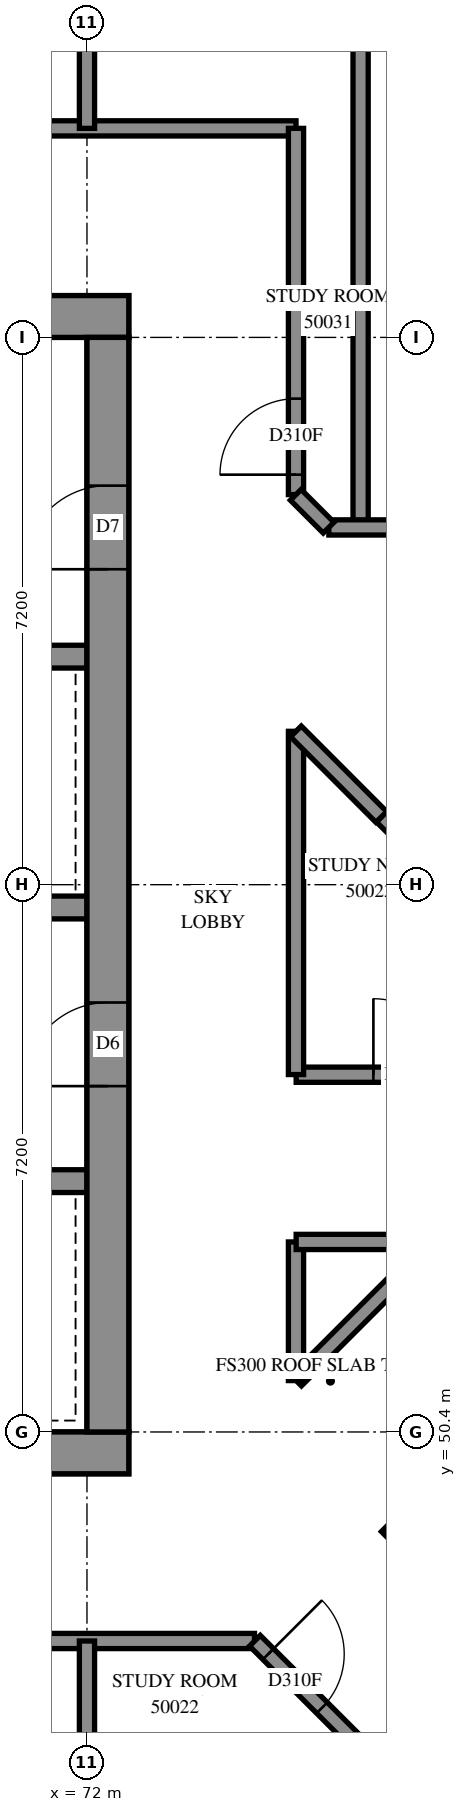
"""IFC4 building model, lengths in metres.
Left out: names, types, materials, properties, quantities, classifications, styles, units other than length and angle.
Written with IfcOpenShell. Run it as: python <this file> out.ifc"""

import sys

from ifc_helpers import new_model, si_unit, direction, frame, frame_2d, origin, place, context, subcontext, project, spatial, rectangle, extrude, element, fill, save


model = new_model("IFC4")
c1 = context("Model", 3, precision=1e-05, world=origin(), true_north=direction((0.0, 1.0)))
c2 = subcontext(c1, "Body", "Model", "MODEL_VIEW")
j1 = project(units=[si_unit("LENGTHUNIT", "METRE"), si_unit("PLANEANGLEUNIT", "RADIAN")], contexts=[c1])
p1 = place(None, origin())
s1 = spatial("IfcSite", under=j1, at=p1, CompositionType="ELEMENT")
p2 = place(p1, origin())
s2 = spatial("IfcBuilding", under=s1, at=p2, CompositionType="ELEMENT")
p3 = place(p2, frame((0.0, 0.0, 185.4)))
s3 = spatial("IfcBuildingStorey", under=s2, at=p3, CompositionType="ELEMENT", Elevation=185.4)
p4 = place(p3, frame((57.05, 50.125, -0.3), z_axis=(0.0, 0.0, 1.0), x_axis=(1.0, 0.0, 0.0)))
e1 = element("IfcWall", 1, at=p4, inside=s3, PredefinedType="SHEAR", context=c2, shape_type="SweptSolid", body=[
    extrude(rectangle(XDim=15.5, YDim=0.55, at=frame_2d((7.75, 0.0))), origin(), (0.0, 0.0, 1.0), 3.5),
])
p5 = place(p3, frame((57.05, 65.075, -0.3), z_axis=(0.0, 0.0, 1.0), x_axis=(1.0, 0.0, 0.0)))
e2 = element("IfcWall", 2, at=p5, inside=s3, PredefinedType="SHEAR", context=c2, shape_type="SweptSolid", body=[
    extrude(rectangle(XDim=15.5, YDim=0.55, at=frame_2d((7.75, 0.0))), origin(), (0.0, 0.0, 1.0), 3.5),
])
p6 = place(p5, frame((10.55, 0.0, 0.3)))
e3 = element("IfcOpeningElement", 3, at=p6, cuts=e2, PredefinedType="OPENING", context=c2, shape_type="SweptSolid", body=[
    extrude(rectangle(XDim=0.8, YDim=2.1, at=frame_2d((0.4, 1.05))), frame((0.0, 0.285, 0.0), z_axis=(0.0, -1.0, 0.0), x_axis=(1.0, 0.0, 0.0)), (0.0, 0.0, 1.0), 0.57),
])
p7 = place(p3, frame((72.275, 50.4, -0.3), z_axis=(0.0, 0.0, 1.0), x_axis=(0.0, 1.0, 0.0)))
e4 = element("IfcWall", 4, at=p7, inside=s3, PredefinedType="SHEAR", context=c2, shape_type="SweptSolid", body=[
    extrude(rectangle(XDim=14.4, YDim=0.55, at=frame_2d((7.2, 0.0))), origin(), (0.0, 0.0, 1.0), 3.5),
])
p8 = place(p7, frame((4.55, 0.0, 0.3)))
e5 = element("IfcOpeningElement", 5, at=p8, cuts=e4, PredefinedType="OPENING", context=c2, shape_type="SweptSolid", body=[
    extrude(rectangle(XDim=1.1, YDim=2.1, at=frame_2d((0.55, 1.05))), frame((0.0, 0.285, 0.0), z_axis=(0.0, -1.0, 0.0), x_axis=(1.0, 0.0, 0.0)), (0.0, 0.0, 1.0), 0.57),
])
p9 = place(p7, frame((11.35, 0.0, 0.3)))
e6 = element("IfcOpeningElement", 6, at=p9, cuts=e4, PredefinedType="OPENING", context=c2, shape_type="SweptSolid", body=[
    extrude(rectangle(XDim=1.1, YDim=2.1, at=frame_2d((0.55, 1.05))), frame((0.0, 0.285, 0.0), z_axis=(0.0, -1.0, 0.0), x_axis=(1.0, 0.0, 0.0)), (0.0, 0.0, 1.0), 0.57),
])
p10 = place(p3, frame((57.6, 53.7, 0.0), z_axis=(0.0, 0.0, 1.0), x_axis=(1.0, 0.0, 0.0)))
e7 = element("IfcWall", 7, at=p10, inside=s3, PredefinedType="SOLIDWALL", context=c2, shape_type="SweptSolid", body=[
    extrude(rectangle(XDim=14.4, YDim=0.3, at=frame_2d((7.2, 0.0))), origin(), (0.0, 0.0, 1.0), 3.9),
])
p11 = place(p10, frame((1.35, 0.0, 0.0)))
e8 = element("IfcOpeningElement", 8, at=p11, cuts=e7, PredefinedType="OPENING", context=c2, shape_type="SweptSolid", body=[
    extrude(rectangle(XDim=0.9, YDim=2.1, at=frame_2d((0.45, 1.05))), frame((0.0, 0.16, 0.0), z_axis=(0.0, -1.0, 0.0), x_axis=(1.0, 0.0, 0.0)), (0.0, 0.0, 1.0), 0.32),
])
p12 = place(p10, frame((4.95, 0.0, 0.0)))
e9 = element("IfcOpeningElement", 9, at=p12, cuts=e7, PredefinedType="OPENING", context=c2, shape_type="SweptSolid", body=[
    extrude(rectangle(XDim=0.9, YDim=2.1, at=frame_2d((0.45, 1.05))), frame((0.0, 0.16, 0.0), z_axis=(0.0, -1.0, 0.0), x_axis=(1.0, 0.0, 0.0)), (0.0, 0.0, 1.0), 0.32),
])
p13 = place(p10, frame((8.55, 0.0, 0.0)))
e10 = element("IfcOpeningElement", 10, at=p13, cuts=e7, PredefinedType="OPENING", context=c2, shape_type="SweptSolid", body=[
    extrude(rectangle(XDim=0.9, YDim=2.1, at=frame_2d((0.45, 1.05))), frame((0.0, 0.16, 0.0), z_axis=(0.0, -1.0, 0.0), x_axis=(1.0, 0.0, 0.0)), (0.0, 0.0, 1.0), 0.32),
])
p14 = place(p10, frame((12.05, 0.0, 0.0)))
e11 = element("IfcOpeningElement", 11, at=p14, cuts=e7, PredefinedType="OPENING", context=c2, shape_type="SweptSolid", body=[
    extrude(rectangle(XDim=1.1, YDim=2.1, at=frame_2d((0.55, 1.05))), frame((0.0, 0.16, 0.0), z_axis=(0.0, -1.0, 0.0), x_axis=(1.0, 0.0, 0.0)), (0.0, 0.0, 1.0), 0.32),
])
p15 = place(p3, frame((57.6, 57.3, 0.0), z_axis=(0.0, 0.0, 1.0), x_axis=(1.0, 0.0, 0.0)))
e12 = element("IfcWall", 12, at=p15, inside=s3, PredefinedType="SOLIDWALL", context=c2, shape_type="SweptSolid", body=[
    extrude(rectangle(XDim=14.4, YDim=0.3, at=frame_2d((7.2, 0.0))), origin(), (0.0, 0.0, 1.0), 3.9),
])
p16 = place(p15, frame((1.25, 0.0, 0.0)))
e13 = element("IfcOpeningElement", 13, at=p16, cuts=e12, PredefinedType="OPENING", context=c2, shape_type="SweptSolid", body=[
    extrude(rectangle(XDim=1.1, YDim=2.1, at=frame_2d((0.55, 1.05))), frame((0.0, 0.16, 0.0), z_axis=(0.0, -1.0, 0.0), x_axis=(1.0, 0.0, 0.0)), (0.0, 0.0, 1.0), 0.32),
])
p17 = place(p15, frame((4.85, 0.0, 0.0)))
e14 = element("IfcOpeningElement", 14, at=p17, cuts=e12, PredefinedType="OPENING", context=c2, shape_type="SweptSolid", body=[
    extrude(rectangle(XDim=1.1, YDim=2.1, at=frame_2d((0.55, 1.05))), frame((0.0, 0.16, 0.0), z_axis=(0.0, -1.0, 0.0), x_axis=(1.0, 0.0, 0.0)), (0.0, 0.0, 1.0), 0.32),
])
p18 = place(p15, frame((8.45, 0.0, 0.0)))
e15 = element("IfcOpeningElement", 15, at=p18, cuts=e12, PredefinedType="OPENING", context=c2, shape_type="SweptSolid", body=[
    extrude(rectangle(XDim=1.1, YDim=2.1, at=frame_2d((0.55, 1.05))), frame((0.0, 0.16, 0.0), z_axis=(0.0, -1.0, 0.0), x_axis=(1.0, 0.0, 0.0)), (0.0, 0.0, 1.0), 0.32),
])
p19 = place(p15, frame((12.05, 0.0, 0.0)))
e16 = element("IfcOpeningElement", 16, at=p19, cuts=e12, PredefinedType="OPENING", context=c2, shape_type="SweptSolid", body=[
    extrude(rectangle(XDim=1.1, YDim=2.1, at=frame_2d((0.55, 1.05))), frame((0.0, 0.16, 0.0), z_axis=(0.0, -1.0, 0.0), x_axis=(1.0, 0.0, 0.0)), (0.0, 0.0, 1.0), 0.32),
])
p20 = place(p3, frame((64.8, 60.6, 0.0), z_axis=(0.0, 0.0, 1.0), x_axis=(1.0, 0.0, 0.0)))
e17 = element("IfcWall", 17, at=p20, inside=s3, PredefinedType="SOLIDWALL", context=c2, shape_type="SweptSolid", body=[
    extrude(rectangle(XDim=7.2, YDim=0.3, at=frame_2d((3.6, 0.0))), origin(), (0.0, 0.0, 1.0), 3.9),
])
p21 = place(p3, frame((76.071, 49.284, -0.3), z_axis=(0.0, 0.0, 1.0), x_axis=(0.7071035554, -0.707110007, 0.0)))
e18 = element("IfcWall", 18, at=p21, inside=s3, PredefinedType="SHEAR", context=c2, shape_type="SweptSolid", body=[
    extrude(rectangle(XDim=15.5, YDim=0.55, at=frame_2d((7.75, 0.0))), origin(), (0.0, 0.0, 1.0), 3.5),
])
p22 = place(p3, frame((54.85, 67.55, 0.0), z_axis=(0.0, 0.0, 1.0), x_axis=(1.0, 0.0, 0.0)))
e19 = element("IfcWall", 19, at=p22, inside=s3, PredefinedType="PARTITIONING", context=c2, shape_type="SweptSolid", body=[
    extrude(rectangle(XDim=19.9, YDim=0.2, at=frame_2d((9.95, 0.0))), origin(), (0.0, 0.0, 1.0), 3.9),
])
p23 = place(p22, frame((4.843, 0.0, 0.0)))
e20 = element("IfcOpeningElement", 20, at=p23, cuts=e19, PredefinedType="OPENING", context=c2, shape_type="SweptSolid", body=[
    extrude(rectangle(XDim=1.0, YDim=2.1, at=frame_2d((0.5, 1.05))), frame((0.0, 0.11, 0.0), z_axis=(0.0, -1.0, 0.0), x_axis=(1.0, 0.0, 0.0)), (0.0, 0.0, 1.0), 0.22),
])
p24 = place(p22, frame((6.918, 0.0, 0.0)))
e21 = element("IfcOpeningElement", 21, at=p24, cuts=e19, PredefinedType="OPENING", context=c2, shape_type="SweptSolid", body=[
    extrude(rectangle(XDim=1.0, YDim=2.1, at=frame_2d((0.5, 1.05))), frame((0.0, 0.11, 0.0), z_axis=(0.0, -1.0, 0.0), x_axis=(1.0, 0.0, 0.0)), (0.0, 0.0, 1.0), 0.22),
])
p25 = place(p22, frame((12.043, 0.0, 0.0)))
e22 = element("IfcOpeningElement", 22, at=p25, cuts=e19, PredefinedType="OPENING", context=c2, shape_type="SweptSolid", body=[
    extrude(rectangle(XDim=1.0, YDim=2.1, at=frame_2d((0.5, 1.05))), frame((0.0, 0.11, 0.0), z_axis=(0.0, -1.0, 0.0), x_axis=(1.0, 0.0, 0.0)), (0.0, 0.0, 1.0), 0.22),
])
p26 = place(p22, frame((14.117, 0.0, 0.0)))
e23 = element("IfcOpeningElement", 23, at=p26, cuts=e19, PredefinedType="OPENING", context=c2, shape_type="SweptSolid", body=[
    extrude(rectangle(XDim=1.0, YDim=2.1, at=frame_2d((0.5, 1.05))), frame((0.0, 0.11, 0.0), z_axis=(0.0, -1.0, 0.0), x_axis=(1.0, 0.0, 0.0)), (0.0, 0.0, 1.0), 0.22),
])
p27 = place(p3, frame((54.85, 47.65, 0.0), z_axis=(0.0, 0.0, 1.0), x_axis=(1.0, 0.0, 0.0)))
e24 = element("IfcWall", 24, at=p27, inside=s3, PredefinedType="PARTITIONING", context=c2, shape_type="SweptSolid", body=[
    extrude(rectangle(XDim=19.354, YDim=0.2, at=frame_2d((9.677, 0.0))), origin(), (0.0, 0.0, 1.0), 3.9),
])
p28 = place(p27, frame((4.782, 0.0, 0.0)))
e25 = element("IfcOpeningElement", 25, at=p28, cuts=e24, PredefinedType="OPENING", context=c2, shape_type="SweptSolid", body=[
    extrude(rectangle(XDim=1.0, YDim=2.1, at=frame_2d((0.5, 1.05))), frame((0.0, 0.11, 0.0), z_axis=(0.0, -1.0, 0.0), x_axis=(1.0, 0.0, 0.0)), (0.0, 0.0, 1.0), 0.22),
])
p29 = place(p27, frame((6.857, 0.0, 0.0)))
e26 = element("IfcOpeningElement", 26, at=p29, cuts=e24, PredefinedType="OPENING", context=c2, shape_type="SweptSolid", body=[
    extrude(rectangle(XDim=1.0, YDim=2.1, at=frame_2d((0.5, 1.05))), frame((0.0, 0.11, 0.0), z_axis=(0.0, -1.0, 0.0), x_axis=(1.0, 0.0, 0.0)), (0.0, 0.0, 1.0), 0.22),
])
p30 = place(p27, frame((11.982, 0.0, 0.0)))
e27 = element("IfcOpeningElement", 27, at=p30, cuts=e24, PredefinedType="OPENING", context=c2, shape_type="SweptSolid", body=[
    extrude(rectangle(XDim=1.0, YDim=2.1, at=frame_2d((0.5, 1.05))), frame((0.0, 0.11, 0.0), z_axis=(0.0, -1.0, 0.0), x_axis=(1.0, 0.0, 0.0)), (0.0, 0.0, 1.0), 0.22),
])
p31 = place(p27, frame((14.057, 0.0, 0.0)))
e28 = element("IfcOpeningElement", 28, at=p31, cuts=e24, PredefinedType="OPENING", context=c2, shape_type="SweptSolid", body=[
    extrude(rectangle(XDim=1.0, YDim=2.1, at=frame_2d((0.5, 1.05))), frame((0.0, 0.11, 0.0), z_axis=(0.0, -1.0, 0.0), x_axis=(1.0, 0.0, 0.0)), (0.0, 0.0, 1.0), 0.22),
])
p32 = place(p3, frame((75.6, 62.3, 0.0), z_axis=(0.0, 0.0, 1.0), x_axis=(0.0, 1.0, 0.0)))
e29 = element("IfcWall", 29, at=p32, inside=s3, PredefinedType="PARTITIONING", context=c2, shape_type="SweptSolid", body=[
    extrude(rectangle(XDim=7.77, YDim=0.2, at=frame_2d((3.885, 0.0))), origin(), (0.0, 0.0, 1.0), 3.9),
])
p33 = place(p3, frame((74.75, 62.732, 0.0), z_axis=(0.0, 0.0, 1.0), x_axis=(0.0, 1.0, 0.0)))
e30 = element("IfcWall", 30, at=p33, inside=s3, PredefinedType="PARTITIONING", context=c2, shape_type="SweptSolid", body=[
    extrude(rectangle(XDim=4.818, YDim=0.2, at=frame_2d((2.409, 0.0))), origin(), (0.0, 0.0, 1.0), 3.9),
])
p34 = place(p33, frame((0.262, 0.0, 0.0)))
e31 = element("IfcOpeningElement", 31, at=p34, cuts=e30, PredefinedType="OPENING", context=c2, shape_type="SweptSolid", body=[
    extrude(rectangle(XDim=1.0, YDim=2.1, at=frame_2d((0.5, 1.05))), frame((0.0, 0.11, 0.0), z_axis=(0.0, -1.0, 0.0), x_axis=(1.0, 0.0, 0.0)), (0.0, 0.0, 1.0), 0.22),
])
p35 = place(p3, frame((74.752, 55.1, 0.0), z_axis=(0.0, 0.0, 1.0), x_axis=(1.0, 0.0, 0.0)))
e32 = element("IfcWall", 32, at=p35, inside=s3, PredefinedType="PARTITIONING", context=c2, shape_type="SweptSolid", body=[
    extrude(rectangle(XDim=4.516, YDim=0.2, at=frame_2d((2.258, 0.0))), origin(), (0.0, 0.0, 1.0), 3.9),
])
p36 = place(p35, frame((1.016, 0.0, 0.0)))
e33 = element("IfcOpeningElement", 33, at=p36, cuts=e32, PredefinedType="OPENING", context=c2, shape_type="SweptSolid", body=[
    extrude(rectangle(XDim=1.0, YDim=2.1, at=frame_2d((0.5, 1.05))), frame((0.0, 0.11, 0.0), z_axis=(0.0, -1.0, 0.0), x_axis=(1.0, 0.0, 0.0)), (0.0, 0.0, 1.0), 0.22),
])
p37 = place(p3, frame((74.75, 55.102, 0.0), z_axis=(0.0, 0.0, 1.0), x_axis=(0.0, 1.0, 0.0)))
e34 = element("IfcWall", 34, at=p37, inside=s3, PredefinedType="PARTITIONING", context=c2, shape_type="SweptSolid", body=[
    extrude(rectangle(XDim=4.516, YDim=0.2, at=frame_2d((2.258, 0.0))), origin(), (0.0, 0.0, 1.0), 3.9),
])
p38 = place(p3, frame((75.182, 62.3, 0.0), z_axis=(0.0, 0.0, 1.0), x_axis=(1.0, 0.0, 0.0)))
e35 = element("IfcWall", 35, at=p38, inside=s3, PredefinedType="PARTITIONING", context=c2, shape_type="SweptSolid", body=[
    extrude(rectangle(XDim=4.018, YDim=0.2, at=frame_2d((2.009, 0.0))), origin(), (0.0, 0.0, 1.0), 3.9),
])
p39 = place(p3, frame((74.209, 47.653, 0.0), z_axis=(0.0, 0.0, 1.0), x_axis=(0.7071067812, -0.7071067812, 0.0)))
e36 = element("IfcWall", 36, at=p39, inside=s3, PredefinedType="PARTITIONING", context=c2, shape_type="SweptSolid", body=[
    extrude(rectangle(XDim=3.564, YDim=0.2, at=frame_2d((1.782, 0.0))), origin(), (0.0, 0.0, 1.0), 3.9),
])
p40 = place(p39, frame((0.248, 0.0, 0.0)))
e37 = element("IfcOpeningElement", 37, at=p40, cuts=e36, PredefinedType="OPENING", context=c2, shape_type="SweptSolid", body=[
    extrude(rectangle(XDim=1.0, YDim=2.1, at=frame_2d((0.5, 1.05))), frame((0.0, 0.11, 0.0), z_axis=(0.0, -1.0, 0.0), x_axis=(1.0, 0.0, 0.0)), (0.0, 0.0, 1.0), 0.22),
])
p41 = place(p3, frame((74.751, 51.077, 0.0), z_axis=(0.0, 0.0, 1.0), x_axis=(0.7071067812, 0.7071067812, 0.0)))
e38 = element("IfcWall", 38, at=p41, inside=s3, PredefinedType="PARTITIONING", context=c2, shape_type="SweptSolid", body=[
    extrude(rectangle(XDim=2.577, YDim=0.2, at=frame_2d((1.288, 0.0))), origin(), (0.0, 0.0, 1.0), 3.9),
])
for number, where, z_axis, x_axis in (
    (39, (72.0, 45.13, 0.0), (0.0, 0.0, 1.0), (0.0, 1.0, 0.0)),
    (40, (72.0, 67.55, 0.0), (0.0, 0.0, 1.0), (0.0, 1.0, 0.0)),
):
    element("IfcWall", number, at=place(p3, frame(where, z_axis=z_axis, x_axis=x_axis)), inside=s3, PredefinedType="PARTITIONING", context=c2, shape_type="SweptSolid", body=[
        extrude(rectangle(XDim=2.52, YDim=0.2, at=frame_2d((1.26, 0.0))), origin(), (0.0, 0.0, 1.0), 3.9),
    ])
p42 = place(p3, frame((75.879, 58.497, 0.0), z_axis=(0.0, 0.0, 1.0), x_axis=(0.7075423257, -0.7066709682, 0.0)))
e41 = element("IfcWall", 41, at=p42, inside=s3, PredefinedType="PARTITIONING", context=c2, shape_type="SweptSolid", body=[
    extrude(rectangle(XDim=2.295, YDim=0.2, at=frame_2d((1.148, 0.0))), origin(), (0.0, 0.0, 1.0), 3.9),
])
p43 = place(p3, frame((74.75, 51.076, 0.0), z_axis=(0.0, 0.0, 1.0), x_axis=(0.0, 1.0, 0.0)))
e42 = element("IfcWall", 42, at=p43, inside=s3, PredefinedType="PARTITIONING", context=c2, shape_type="SweptSolid", body=[
    extrude(rectangle(XDim=1.824, YDim=0.2, at=frame_2d((0.912, 0.0))), origin(), (0.0, 0.0, 1.0), 3.9),
])
p44 = place(p3, frame((74.752, 52.9, 0.0), z_axis=(0.0, 0.0, 1.0), x_axis=(1.0, 0.0, 0.0)))
e43 = element("IfcWall", 43, at=p44, inside=s3, PredefinedType="PARTITIONING", context=c2, shape_type="SweptSolid", body=[
    extrude(rectangle(XDim=1.822, YDim=0.2, at=frame_2d((0.911, 0.0))), origin(), (0.0, 0.0, 1.0), 3.9),
])
p45 = place(p3, frame((74.749, 59.617, 0.0), z_axis=(0.0, 0.0, 1.0), x_axis=(0.7064779627, -0.7077350409, 0.0)))
e44 = element("IfcWall", 44, at=p45, inside=s3, PredefinedType="PARTITIONING", context=c2, shape_type="SweptSolid", body=[
    extrude(rectangle(XDim=1.591, YDim=0.2, at=frame_2d((0.795, 0.0))), origin(), (0.0, 0.0, 1.0), 3.9),
])
p46 = place(p3, frame((74.747, 62.729, 0.0), z_axis=(0.0, 0.0, 1.0), x_axis=(0.7071067812, -0.7071067812, 0.0)))
e45 = element("IfcWall", 45, at=p46, inside=s3, PredefinedType="PARTITIONING", context=c2, shape_type="SweptSolid", body=[
    extrude(rectangle(XDim=0.611, YDim=0.2, at=frame_2d((0.305, 0.0))), origin(), (0.0, 0.0, 1.0), 3.9),
])
p47 = place(p8, origin())
e46 = element("IfcDoor", 46, at=p47, inside=s3, OperationType="DOUBLE_DOOR_SINGLE_SWING", PredefinedType="DOOR", context=c2, shape_type="SweptSolid", body=[
    extrude(rectangle(XDim=1.1, YDim=2.1, at=frame_2d((0.55, 1.05))), frame((0.0, 0.025, 0.0), z_axis=(0.0, -1.0, 0.0), x_axis=(1.0, 0.0, 0.0)), (0.0, 0.0, 1.0), 0.05),
])
fill(e5, e46)
p48 = place(p9, origin())
e47 = element("IfcDoor", 47, at=p48, inside=s3, OperationType="SINGLE_SWING_RIGHT", PredefinedType="DOOR", context=c2, shape_type="SweptSolid", body=[
    extrude(rectangle(XDim=1.1, YDim=2.1, at=frame_2d((0.55, 1.05))), frame((0.0, 0.025, 0.0), z_axis=(0.0, -1.0, 0.0), x_axis=(1.0, 0.0, 0.0)), (0.0, 0.0, 1.0), 0.05),
])
fill(e6, e47)
p49 = place(p40, origin())
e48 = element("IfcDoor", 48, at=p49, inside=s3, OperationType="SINGLE_SWING_LEFT", PredefinedType="DOOR", context=c2, shape_type="SweptSolid", body=[
    extrude(rectangle(XDim=1.0, YDim=2.1, at=frame_2d((0.5, 1.05))), frame((0.0, 0.025, 0.0), z_axis=(0.0, -1.0, 0.0), x_axis=(1.0, 0.0, 0.0)), (0.0, 0.0, 1.0), 0.05),
])
fill(e37, e48)
p50 = place(p36, origin())
e49 = element("IfcDoor", 49, at=p50, inside=s3, OperationType="SINGLE_SWING_LEFT", PredefinedType="DOOR", context=c2, shape_type="SweptSolid", body=[
    extrude(rectangle(XDim=1.0, YDim=2.1, at=frame_2d((0.5, 1.05))), frame((0.0, 0.025, 0.0), z_axis=(0.0, -1.0, 0.0), x_axis=(1.0, 0.0, 0.0)), (0.0, 0.0, 1.0), 0.05),
])
fill(e33, e49)
p51 = place(p34, origin())
e50 = element("IfcDoor", 50, at=p51, inside=s3, OperationType="SINGLE_SWING_RIGHT", PredefinedType="DOOR", context=c2, shape_type="SweptSolid", body=[
    extrude(rectangle(XDim=1.0, YDim=2.1, at=frame_2d((0.5, 1.05))), frame((0.0, 0.025, 0.0), z_axis=(0.0, -1.0, 0.0), x_axis=(1.0, 0.0, 0.0)), (0.0, 0.0, 1.0), 0.05),
])
fill(e31, e50)
save(model, sys.argv[1])
